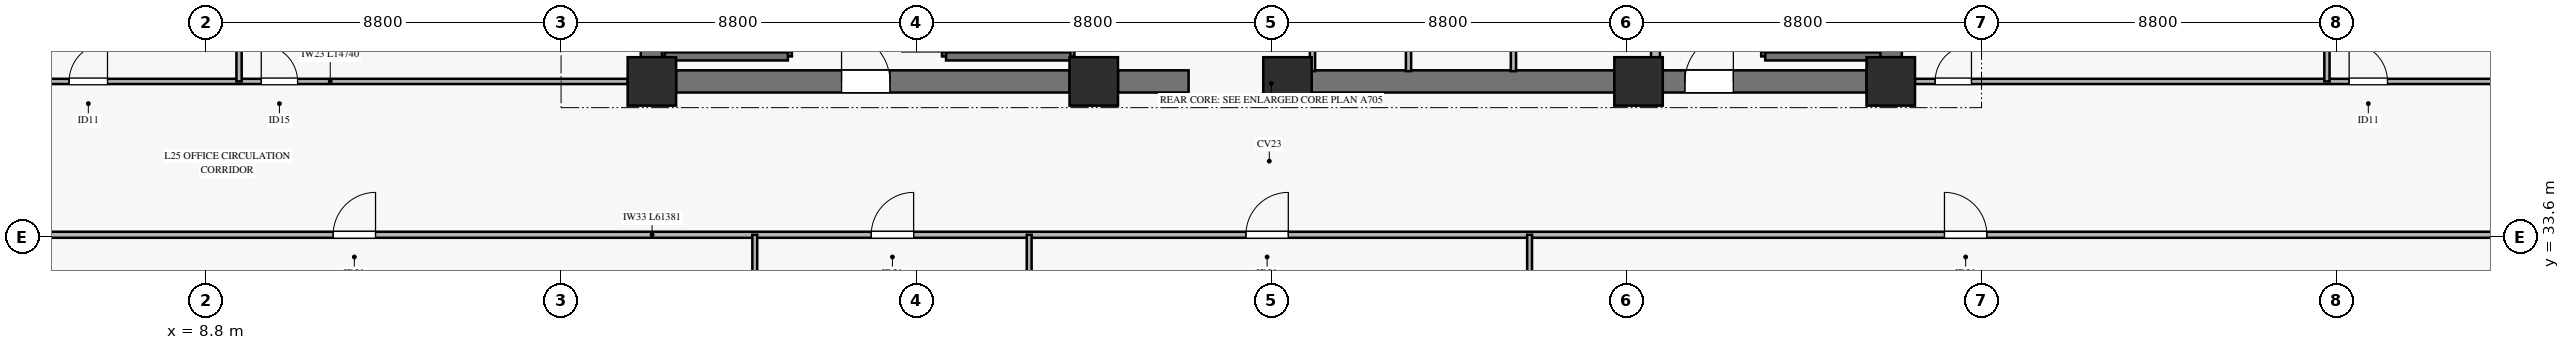
"""IFC4 building model, lengths in metres.
Left out: names, types, materials, properties, quantities, classifications, styles, units other than length and angle.
Written with IfcOpenShell. Run it as: python <this file> out.ifc"""

import sys

from ifc_helpers import new_model, si_unit, direction, frame, frame_2d, origin, origin_2d, place, context, subcontext, project, spatial, rectangle, extrude, source, transform, mapped, element, fill, save


model = new_model("IFC4")
c1 = context("Model", 3, precision=1e-05, world=origin(), true_north=direction((0.0, 1.0)))
c2 = subcontext(c1, "Body", "Model", "MODEL_VIEW")
j1 = project(units=[si_unit("LENGTHUNIT", "METRE"), si_unit("PLANEANGLEUNIT", "RADIAN")], contexts=[c1])
p1 = place(None, origin())
s1 = spatial("IfcSite", under=j1, at=p1, CompositionType="ELEMENT")
p2 = place(p1, origin())
s2 = spatial("IfcBuilding", under=s1, at=p2, CompositionType="ELEMENT")
p3 = place(p2, frame((0.0, 0.0, 103.6)))
s3 = spatial("IfcBuildingStorey", under=s2, at=p3, CompositionType="ELEMENT", Elevation=103.6)
m1 = source(origin(), c2, "Body", "SweptSolid", [
    extrude(rectangle(XDim=1.2, YDim=1.2, at=origin_2d()), origin(), (0.0, 0.0, 1.0), 3.68),
])
for number, where, z_axis, x_axis in (
    (1, (19.85, 37.45, 0.0), (0.0, 0.0, 1.0), (1.0, 0.0, 0.0)),
    (2, (30.8, 37.45, 0.0), (0.0, 0.0, 1.0), (1.0, 0.0, 0.0)),
    (3, (35.6, 37.45, 0.0), (0.0, 0.0, 1.0), (1.0, 0.0, 0.0)),
    (4, (44.3, 37.45, 0.0), (0.0, 0.0, 1.0), (1.0, 0.0, 0.0)),
    (5, (50.55, 37.45, 0.0), (0.0, 0.0, 1.0), (1.0, 0.0, 0.0)),
):
    element("IfcColumn", number, at=place(p3, frame(where, z_axis=z_axis, x_axis=x_axis)), inside=s3, PredefinedType="PILASTER", context=c2, shape_type="MappedRepresentation", body=[
        mapped(m1, transform((0.0, 0.0, 0.0), x_axis=(1.0, 0.0, 0.0), y_axis=(0.0, 1.0, 0.0), z_axis=(0.0, 0.0, 1.0), scale=1.0)),
    ])
p4 = place(p3, frame((20.45, 37.45, 0.0), z_axis=(0.0, 0.0, 1.0), x_axis=(1.0, 0.0, 0.0)))
e6 = element("IfcWall", 6, at=p4, inside=s3, PredefinedType="SHEAR", context=c2, shape_type="SweptSolid", body=[
    extrude(rectangle(XDim=9.75, YDim=0.55, at=frame_2d((4.875, 0.0))), origin(), (0.0, 0.0, 1.0), 3.68),
])
p5 = place(p4, frame((4.1, 0.0, 0.0)))
e7 = element("IfcOpeningElement", 7, at=p5, cuts=e6, PredefinedType="OPENING", context=c2, shape_type="SweptSolid", body=[
    extrude(rectangle(XDim=1.2, YDim=2.15, at=frame_2d((0.6, 1.075))), frame((0.0, 0.285, 0.0), z_axis=(0.0, -1.0, 0.0), x_axis=(1.0, 0.0, 0.0)), (0.0, 0.0, 1.0), 0.57),
])
p6 = place(p3, frame((31.4, 37.45, 0.0), z_axis=(0.0, 0.0, 1.0), x_axis=(1.0, 0.0, 0.0)))
e8 = element("IfcWall", 8, at=p6, inside=s3, PredefinedType="SHEAR", context=c2, shape_type="SweptSolid", body=[
    extrude(rectangle(XDim=1.75, YDim=0.55, at=frame_2d((0.875, 0.0))), origin(), (0.0, 0.0, 1.0), 3.68),
])
p7 = place(p3, frame((36.2, 37.45, 0.0), z_axis=(0.0, 0.0, 1.0), x_axis=(1.0, 0.0, 0.0)))
e9 = element("IfcWall", 9, at=p7, inside=s3, PredefinedType="SHEAR", context=c2, shape_type="SweptSolid", body=[
    extrude(rectangle(XDim=7.5, YDim=0.55, at=frame_2d((3.75, 0.0))), origin(), (0.0, 0.0, 1.0), 3.68),
])
p8 = place(p3, frame((44.9, 37.45, 0.0), z_axis=(0.0, 0.0, 1.0), x_axis=(1.0, 0.0, 0.0)))
e10 = element("IfcWall", 10, at=p8, inside=s3, PredefinedType="SHEAR", context=c2, shape_type="SweptSolid", body=[
    extrude(rectangle(XDim=5.05, YDim=0.55, at=frame_2d((2.525, 0.0))), origin(), (0.0, 0.0, 1.0), 3.68),
])
p9 = place(p8, frame((0.55, 0.0, 0.0)))
e11 = element("IfcOpeningElement", 11, at=p9, cuts=e10, PredefinedType="OPENING", context=c2, shape_type="SweptSolid", body=[
    extrude(rectangle(XDim=1.2, YDim=2.15, at=frame_2d((0.6, 1.075))), frame((0.0, 0.285, 0.0), z_axis=(0.0, -1.0, 0.0), x_axis=(1.0, 0.0, 0.0)), (0.0, 0.0, 1.0), 0.57),
])
for number, where, z_axis, x_axis in (
    (12, (19.85, 38.05, 0.0), (0.0, 0.0, 1.0), (0.0, 1.0, 0.0)),
    (13, (50.55, 38.05, 0.0), (0.0, 0.0, 1.0), (0.0, 1.0, 0.0)),
):
    element("IfcWall", number, at=place(p3, frame(where, z_axis=z_axis, x_axis=x_axis)), inside=s3, PredefinedType="SHEAR", context=c2, shape_type="SweptSolid", body=[
        extrude(rectangle(XDim=7.9, YDim=0.55, at=frame_2d((3.95, 0.0))), origin(), (0.0, 0.0, 1.0), 3.68),
    ])
p10 = place(p3, frame((20.17, 38.07, 0.0), z_axis=(0.0, 0.0, 1.0), x_axis=(0.0, 1.0, 0.0)))
e14 = element("IfcWall", 14, at=p10, inside=s3, PredefinedType="SOLIDWALL", context=c2, shape_type="SweptSolid", body=[
    extrude(rectangle(XDim=7.25, YDim=0.14, at=frame_2d((3.625, 0.0))), origin(), (0.0, 0.0, 1.0), 3.9),
])
p11 = place(p3, frame((23.22, 38.07, 0.0), z_axis=(0.0, 0.0, 1.0), x_axis=(0.0, 1.0, 0.0)))
e15 = element("IfcWall", 15, at=p11, inside=s3, PredefinedType="SOLIDWALL", context=c2, shape_type="SweptSolid", body=[
    extrude(rectangle(XDim=7.25, YDim=0.2, at=frame_2d((3.625, 0.0))), origin(), (0.0, 0.0, 1.0), 3.9),
])
p12 = place(p11, frame((0.11, 0.0, 0.0)))
e16 = element("IfcOpeningElement", 16, at=p12, cuts=e15, PredefinedType="OPENING", context=c2, shape_type="SweptSolid", body=[
    extrude(rectangle(XDim=1.1, YDim=2.15, at=frame_2d((0.55, 1.075))), frame((0.0, 0.11, 0.0), z_axis=(0.0, -1.0, 0.0), x_axis=(1.0, 0.0, 0.0)), (0.0, 0.0, 1.0), 0.22),
])
p13 = place(p3, frame((20.17, 38.07, 0.0), z_axis=(0.0, 0.0, 1.0), x_axis=(1.0, 0.0, 0.0)))
e17 = element("IfcWall", 17, at=p13, inside=s3, PredefinedType="SOLIDWALL", context=c2, shape_type="SweptSolid", body=[
    extrude(rectangle(XDim=3.05, YDim=0.2, at=frame_2d((1.525, 0.0))), origin(), (0.0, 0.0, 1.0), 3.9),
])
p14 = place(p3, frame((27.14, 38.07, 0.0), z_axis=(0.0, 0.0, 1.0), x_axis=(0.0, 1.0, 0.0)))
e18 = element("IfcWall", 18, at=p14, inside=s3, PredefinedType="SOLIDWALL", context=c2, shape_type="SweptSolid", body=[
    extrude(rectangle(XDim=7.25, YDim=0.2, at=frame_2d((3.625, 0.0))), origin(), (0.0, 0.0, 1.0), 3.9),
])
p15 = place(p14, frame((0.11, 0.0, 0.0)))
e19 = element("IfcOpeningElement", 19, at=p15, cuts=e18, PredefinedType="OPENING", context=c2, shape_type="SweptSolid", body=[
    extrude(rectangle(XDim=1.1, YDim=2.15, at=frame_2d((0.55, 1.075))), frame((0.0, 0.11, 0.0), z_axis=(0.0, -1.0, 0.0), x_axis=(1.0, 0.0, 0.0)), (0.0, 0.0, 1.0), 0.22),
])
p16 = place(p3, frame((30.22, 38.07, 0.0), z_axis=(0.0, 0.0, 1.0), x_axis=(0.0, 1.0, 0.0)))
e20 = element("IfcWall", 20, at=p16, inside=s3, PredefinedType="SOLIDWALL", context=c2, shape_type="SweptSolid", body=[
    extrude(rectangle(XDim=7.25, YDim=0.2, at=frame_2d((3.625, 0.0))), origin(), (0.0, 0.0, 1.0), 3.9),
])
p17 = place(p3, frame((27.14, 38.07, 0.0), z_axis=(0.0, 0.0, 1.0), x_axis=(1.0, 0.0, 0.0)))
e21 = element("IfcWall", 21, at=p17, inside=s3, PredefinedType="SOLIDWALL", context=c2, shape_type="SweptSolid", body=[
    extrude(rectangle(XDim=3.08, YDim=0.2, at=frame_2d((1.54, 0.0))), origin(), (0.0, 0.0, 1.0), 3.9),
])
p18 = place(p3, frame((47.44, 38.07, 0.0), z_axis=(0.0, 0.0, 1.0), x_axis=(0.0, 1.0, 0.0)))
e22 = element("IfcWall", 22, at=p18, inside=s3, PredefinedType="SOLIDWALL", context=c2, shape_type="SweptSolid", body=[
    extrude(rectangle(XDim=7.25, YDim=0.2, at=frame_2d((3.625, 0.0))), origin(), (0.0, 0.0, 1.0), 3.9),
])
p19 = place(p18, frame((0.11, 0.0, 0.0)))
e23 = element("IfcOpeningElement", 23, at=p19, cuts=e22, PredefinedType="OPENING", context=c2, shape_type="SweptSolid", body=[
    extrude(rectangle(XDim=1.1, YDim=2.15, at=frame_2d((0.55, 1.075))), frame((0.0, 0.11, 0.0), z_axis=(0.0, -1.0, 0.0), x_axis=(1.0, 0.0, 0.0)), (0.0, 0.0, 1.0), 0.22),
])
p20 = place(p3, frame((47.44, 38.07, 0.0), z_axis=(0.0, 0.0, 1.0), x_axis=(1.0, 0.0, 0.0)))
e24 = element("IfcWall", 24, at=p20, inside=s3, PredefinedType="SOLIDWALL", context=c2, shape_type="SweptSolid", body=[
    extrude(rectangle(XDim=2.855, YDim=0.2, at=frame_2d((1.427, 0.0))), origin(), (0.0, 0.0, 1.0), 3.9),
])
p21 = place(p3, frame((44.72, 37.705, 0.0), z_axis=(0.0, 0.0, 1.0), x_axis=(0.0, 1.0, 0.0)))
e25 = element("IfcWall", 25, at=p21, inside=s3, PredefinedType="SOLIDWALL", context=c2, shape_type="SweptSolid", body=[
    extrude(rectangle(XDim=7.515, YDim=0.22, at=frame_2d((3.757, 0.0))), origin(), (0.0, 0.0, 1.0), 3.68),
])
p22 = place(p3, frame((36.22, 37.705, 0.0), z_axis=(0.0, 0.0, 1.0), x_axis=(0.0, 1.0, 0.0)))
e26 = element("IfcWall", 26, at=p22, inside=s3, PredefinedType="PARTITIONING", context=c2, shape_type="SweptSolid", body=[
    extrude(rectangle(XDim=2.215, YDim=0.13, at=frame_2d((1.107, 0.0))), origin(), (0.0, 0.0, 1.0), 3.68),
])
p23 = place(p22, frame((0.905, 0.0, 0.0)))
e27 = element("IfcOpeningElement", 27, at=p23, cuts=e26, PredefinedType="OPENING", context=c2, shape_type="SweptSolid", body=[
    extrude(rectangle(XDim=0.9, YDim=2.1, at=frame_2d((0.45, 1.05))), frame((0.0, 0.075, 0.0), z_axis=(0.0, -1.0, 0.0), x_axis=(1.0, 0.0, 0.0)), (0.0, 0.0, 1.0), 0.15),
])
p24 = place(p3, frame((38.6, 37.705, 0.0), z_axis=(0.0, 0.0, 1.0), x_axis=(0.0, 1.0, 0.0)))
e28 = element("IfcWall", 28, at=p24, inside=s3, PredefinedType="PARTITIONING", context=c2, shape_type="SweptSolid", body=[
    extrude(rectangle(XDim=2.215, YDim=0.13, at=frame_2d((1.107, 0.0))), origin(), (0.0, 0.0, 1.0), 3.68),
])
p25 = place(p24, frame((0.615, 0.0, 0.0)))
e29 = element("IfcOpeningElement", 29, at=p25, cuts=e28, PredefinedType="OPENING", context=c2, shape_type="SweptSolid", body=[
    extrude(rectangle(XDim=0.9, YDim=2.1, at=frame_2d((0.45, 1.05))), frame((0.0, 0.075, 0.0), z_axis=(0.0, -1.0, 0.0), x_axis=(1.0, 0.0, 0.0)), (0.0, 0.0, 1.0), 0.15),
])
p26 = place(p3, frame((41.2, 37.705, 0.0), z_axis=(0.0, 0.0, 1.0), x_axis=(0.0, 1.0, 0.0)))
e30 = element("IfcWall", 30, at=p26, inside=s3, PredefinedType="PARTITIONING", context=c2, shape_type="SweptSolid", body=[
    extrude(rectangle(XDim=2.215, YDim=0.13, at=frame_2d((1.107, 0.0))), origin(), (0.0, 0.0, 1.0), 3.68),
])
p27 = place(p26, frame((0.615, 0.0, 0.0)))
e31 = element("IfcOpeningElement", 31, at=p27, cuts=e30, PredefinedType="OPENING", context=c2, shape_type="SweptSolid", body=[
    extrude(rectangle(XDim=0.9, YDim=2.1, at=frame_2d((0.45, 1.05))), frame((0.0, 0.075, 0.0), z_axis=(0.0, -1.0, 0.0), x_axis=(1.0, 0.0, 0.0)), (0.0, 0.0, 1.0), 0.15),
])
p28 = place(p3, frame((4.51, 33.65, 0.0), z_axis=(0.0, 0.0, 1.0), x_axis=(1.0, 0.0, 0.0)))
e32 = element("IfcWall", 32, at=p28, inside=s3, PredefinedType="PARTITIONING", context=c2, shape_type="SweptSolid", body=[
    extrude(rectangle(XDim=61.381, YDim=0.15, at=frame_2d((30.69, 0.0))), origin(), (0.0, 0.0, 1.0), 2.765),
])
p29 = place(p28, frame((7.442, 0.0, 0.0)))
e33 = element("IfcOpeningElement", 33, at=p29, cuts=e32, PredefinedType="OPENING", context=c2, shape_type="SweptSolid", body=[
    extrude(rectangle(XDim=1.05, YDim=2.15, at=frame_2d((0.525, 1.075))), frame((0.0, 0.085, 0.0), z_axis=(0.0, -1.0, 0.0), x_axis=(1.0, 0.0, 0.0)), (0.0, 0.0, 1.0), 0.17),
])
p30 = place(p28, frame((20.776, 0.0, 0.0)))
e34 = element("IfcOpeningElement", 34, at=p30, cuts=e32, PredefinedType="OPENING", context=c2, shape_type="SweptSolid", body=[
    extrude(rectangle(XDim=1.05, YDim=2.15, at=frame_2d((0.525, 1.075))), frame((0.0, 0.085, 0.0), z_axis=(0.0, -1.0, 0.0), x_axis=(1.0, 0.0, 0.0)), (0.0, 0.0, 1.0), 0.17),
])
p31 = place(p28, frame((30.061, 0.0, 0.0)))
e35 = element("IfcOpeningElement", 35, at=p31, cuts=e32, PredefinedType="OPENING", context=c2, shape_type="SweptSolid", body=[
    extrude(rectangle(XDim=1.05, YDim=2.15, at=frame_2d((0.525, 1.075))), frame((0.0, 0.085, 0.0), z_axis=(0.0, -1.0, 0.0), x_axis=(1.0, 0.0, 0.0)), (0.0, 0.0, 1.0), 0.17),
])
p32 = place(p28, frame((47.371, 0.0, 0.0)))
e36 = element("IfcOpeningElement", 36, at=p32, cuts=e32, PredefinedType="OPENING", context=c2, shape_type="SweptSolid", body=[
    extrude(rectangle(XDim=1.05, YDim=2.15, at=frame_2d((0.525, 1.075))), frame((0.0, 0.085, 0.0), z_axis=(0.0, -1.0, 0.0), x_axis=(1.0, 0.0, 0.0)), (0.0, 0.0, 1.0), 0.17),
])
for number, where, z_axis, x_axis in (
    (37, (22.4, 6.462, 0.0), (0.0, 0.0, 1.0), (0.0, 1.0, 0.0)),
    (38, (29.2, 6.462, 0.0), (0.0, 0.0, 1.0), (0.0, 1.0, 0.0)),
    (39, (41.6, 6.462, 0.0), (0.0, 0.0, 1.0), (0.0, 1.0, 0.0)),
):
    element("IfcWall", number, at=place(p3, frame(where, z_axis=z_axis, x_axis=x_axis)), inside=s3, PredefinedType="PARTITIONING", context=c2, shape_type="SweptSolid", body=[
        extrude(rectangle(XDim=27.188, YDim=0.12, at=frame_2d((13.594, 0.0))), origin(), (0.0, 0.0, 1.0), 3.165),
    ])
p33 = place(p3, frame((4.51, 37.45, 0.0), z_axis=(0.0, 0.0, 1.0), x_axis=(1.0, 0.0, 0.0)))
e40 = element("IfcWall", 40, at=p33, inside=s3, PredefinedType="PARTITIONING", context=c2, shape_type="SweptSolid", body=[
    extrude(rectangle(XDim=14.74, YDim=0.13, at=frame_2d((7.37, 0.0))), origin(), (0.0, 0.0, 1.0), 3.165),
])
p34 = place(p33, frame((0.9, 0.0, 0.0)))
e41 = element("IfcOpeningElement", 41, at=p34, cuts=e40, PredefinedType="OPENING", context=c2, shape_type="SweptSolid", body=[
    extrude(rectangle(XDim=0.95, YDim=2.1, at=frame_2d((0.475, 1.05))), frame((0.0, 0.075, 0.0), z_axis=(0.0, -1.0, 0.0), x_axis=(1.0, 0.0, 0.0)), (0.0, 0.0, 1.0), 0.15),
])
p35 = place(p33, frame((5.66, 0.0, 0.0)))
e42 = element("IfcOpeningElement", 42, at=p35, cuts=e40, PredefinedType="OPENING", context=c2, shape_type="SweptSolid", body=[
    extrude(rectangle(XDim=0.9, YDim=2.1, at=frame_2d((0.45, 1.05))), frame((0.0, 0.075, 0.0), z_axis=(0.0, -1.0, 0.0), x_axis=(1.0, 0.0, 0.0)), (0.0, 0.0, 1.0), 0.15),
])
p36 = place(p3, frame((9.62, 37.45, 0.0), z_axis=(0.0, 0.0, 1.0), x_axis=(0.0, 1.0, 0.0)))
e43 = element("IfcWall", 43, at=p36, inside=s3, PredefinedType="PARTITIONING", context=c2, shape_type="SweptSolid", body=[
    extrude(rectangle(XDim=8.8, YDim=0.13, at=frame_2d((4.4, 0.0))), origin(), (0.0, 0.0, 1.0), 3.68),
])
p37 = place(p3, frame((51.15, 37.45, 0.0), z_axis=(0.0, 0.0, 1.0), x_axis=(1.0, 0.0, 0.0)))
e44 = element("IfcWall", 44, at=p37, inside=s3, PredefinedType="PARTITIONING", context=c2, shape_type="SweptSolid", body=[
    extrude(rectangle(XDim=14.741, YDim=0.13, at=frame_2d((7.371, 0.0))), origin(), (0.0, 0.0, 1.0), 3.165),
])
p38 = place(p37, frame((0.5, 0.0, 0.0)))
e45 = element("IfcOpeningElement", 45, at=p38, cuts=e44, PredefinedType="OPENING", context=c2, shape_type="SweptSolid", body=[
    extrude(rectangle(XDim=0.9, YDim=2.1, at=frame_2d((0.45, 1.05))), frame((0.0, 0.075, 0.0), z_axis=(0.0, -1.0, 0.0), x_axis=(1.0, 0.0, 0.0)), (0.0, 0.0, 1.0), 0.15),
])
p39 = place(p37, frame((10.759, 0.0, 0.0)))
e46 = element("IfcOpeningElement", 46, at=p39, cuts=e44, PredefinedType="OPENING", context=c2, shape_type="SweptSolid", body=[
    extrude(rectangle(XDim=0.95, YDim=2.1, at=frame_2d((0.475, 1.05))), frame((0.0, 0.075, 0.0), z_axis=(0.0, -1.0, 0.0), x_axis=(1.0, 0.0, 0.0)), (0.0, 0.0, 1.0), 0.15),
])
p40 = place(p3, frame((61.359, 37.45, 0.0), z_axis=(0.0, 0.0, 1.0), x_axis=(0.0, 1.0, 0.0)))
e47 = element("IfcWall", 47, at=p40, inside=s3, PredefinedType="PARTITIONING", context=c2, shape_type="SweptSolid", body=[
    extrude(rectangle(XDim=8.8, YDim=0.13, at=frame_2d((4.4, 0.0))), origin(), (0.0, 0.0, 1.0), 3.68),
])
m2 = source(origin(), c2, "Body", "SweptSolid", [
    extrude(rectangle(XDim=1.2, YDim=2.15, at=frame_2d((0.6, 1.075))), frame((0.0, 0.025, 0.0), z_axis=(0.0, -1.0, 0.0), x_axis=(1.0, 0.0, 0.0)), (0.0, 0.0, 1.0), 0.05),
])
p41 = place(p5, origin())
e48 = element("IfcDoor", 48, at=p41, inside=s3, OperationType="SINGLE_SWING_LEFT", PredefinedType="DOOR", context=c2, shape_type="MappedRepresentation", body=[
    mapped(m2, transform((0.0, 0.0, 0.0), x_axis=(1.0, 0.0, 0.0), y_axis=(0.0, 1.0, 0.0), z_axis=(0.0, 0.0, 1.0), scale=1.0)),
])
fill(e7, e48)
p42 = place(p9, origin())
e49 = element("IfcDoor", 49, at=p42, inside=s3, OperationType="SINGLE_SWING_RIGHT", PredefinedType="DOOR", context=c2, shape_type="MappedRepresentation", body=[
    mapped(m2, transform((0.0, 0.0, 0.0), x_axis=(1.0, 0.0, 0.0), y_axis=(0.0, 1.0, 0.0), z_axis=(0.0, 0.0, 1.0), scale=1.0)),
])
fill(e11, e49)
m3 = source(origin(), c2, "Body", "SweptSolid", [
    extrude(rectangle(XDim=1.05, YDim=2.15, at=frame_2d((0.525, 1.075))), frame((0.0, 0.025, 0.0), z_axis=(0.0, -1.0, 0.0), x_axis=(1.0, 0.0, 0.0)), (0.0, 0.0, 1.0), 0.05),
])
p43 = place(p29, origin())
e50 = element("IfcDoor", 50, at=p43, inside=s3, OperationType="SINGLE_SWING_RIGHT", PredefinedType="DOOR", context=c2, shape_type="MappedRepresentation", body=[
    mapped(m3, transform((0.0, 0.0, 0.0), x_axis=(1.0, 0.0, 0.0), y_axis=(0.0, 1.0, 0.0), z_axis=(0.0, 0.0, 1.0), scale=1.0)),
])
fill(e33, e50)
p44 = place(p30, origin())
e51 = element("IfcDoor", 51, at=p44, inside=s3, OperationType="SINGLE_SWING_RIGHT", PredefinedType="DOOR", context=c2, shape_type="MappedRepresentation", body=[
    mapped(m3, transform((0.0, 0.0, 0.0), x_axis=(1.0, 0.0, 0.0), y_axis=(0.0, 1.0, 0.0), z_axis=(0.0, 0.0, 1.0), scale=1.0)),
])
fill(e34, e51)
p45 = place(p31, origin())
e52 = element("IfcDoor", 52, at=p45, inside=s3, OperationType="SINGLE_SWING_RIGHT", PredefinedType="DOOR", context=c2, shape_type="MappedRepresentation", body=[
    mapped(m3, transform((0.0, 0.0, 0.0), x_axis=(1.0, 0.0, 0.0), y_axis=(0.0, 1.0, 0.0), z_axis=(0.0, 0.0, 1.0), scale=1.0)),
])
fill(e35, e52)
p46 = place(p32, origin())
e53 = element("IfcDoor", 53, at=p46, inside=s3, OperationType="SINGLE_SWING_LEFT", PredefinedType="DOOR", context=c2, shape_type="MappedRepresentation", body=[
    mapped(m3, transform((0.0, 0.0, 0.0), x_axis=(1.0, 0.0, 0.0), y_axis=(0.0, 1.0, 0.0), z_axis=(0.0, 0.0, 1.0), scale=1.0)),
])
fill(e36, e53)
m4 = source(origin(), c2, "Body", "SweptSolid", [
    extrude(rectangle(XDim=0.95, YDim=2.1, at=frame_2d((0.475, 1.05))), frame((0.0, 0.025, 0.0), z_axis=(0.0, -1.0, 0.0), x_axis=(1.0, 0.0, 0.0)), (0.0, 0.0, 1.0), 0.05),
])
p47 = place(p34, origin())
e54 = element("IfcDoor", 54, at=p47, inside=s3, OperationType="SINGLE_SWING_RIGHT", PredefinedType="DOOR", context=c2, shape_type="MappedRepresentation", body=[
    mapped(m4, transform((0.0, 0.0, 0.0), x_axis=(1.0, 0.0, 0.0), y_axis=(0.0, 1.0, 0.0), z_axis=(0.0, 0.0, 1.0), scale=1.0)),
])
fill(e41, e54)
m5 = source(origin(), c2, "Body", "SweptSolid", [
    extrude(rectangle(XDim=0.9, YDim=2.1, at=frame_2d((0.45, 1.05))), frame((0.0, 0.025, 0.0), z_axis=(0.0, -1.0, 0.0), x_axis=(1.0, 0.0, 0.0)), (0.0, 0.0, 1.0), 0.05),
])
p48 = place(p35, origin())
e55 = element("IfcDoor", 55, at=p48, inside=s3, OperationType="SINGLE_SWING_LEFT", PredefinedType="DOOR", context=c2, shape_type="MappedRepresentation", body=[
    mapped(m5, transform((0.0, 0.0, 0.0), x_axis=(1.0, 0.0, 0.0), y_axis=(0.0, 1.0, 0.0), z_axis=(0.0, 0.0, 1.0), scale=1.0)),
])
fill(e42, e55)
p49 = place(p38, origin())
e56 = element("IfcDoor", 56, at=p49, inside=s3, OperationType="SINGLE_SWING_RIGHT", PredefinedType="DOOR", context=c2, shape_type="MappedRepresentation", body=[
    mapped(m5, transform((0.0, 0.0, 0.0), x_axis=(1.0, 0.0, 0.0), y_axis=(0.0, 1.0, 0.0), z_axis=(0.0, 0.0, 1.0), scale=1.0)),
])
fill(e45, e56)
p50 = place(p39, origin())
e57 = element("IfcDoor", 57, at=p50, inside=s3, OperationType="SINGLE_SWING_LEFT", PredefinedType="DOOR", context=c2, shape_type="MappedRepresentation", body=[
    mapped(m4, transform((0.0, 0.0, 0.0), x_axis=(1.0, 0.0, 0.0), y_axis=(0.0, 1.0, 0.0), z_axis=(0.0, 0.0, 1.0), scale=1.0)),
])
fill(e46, e57)
save(model, sys.argv[1])
